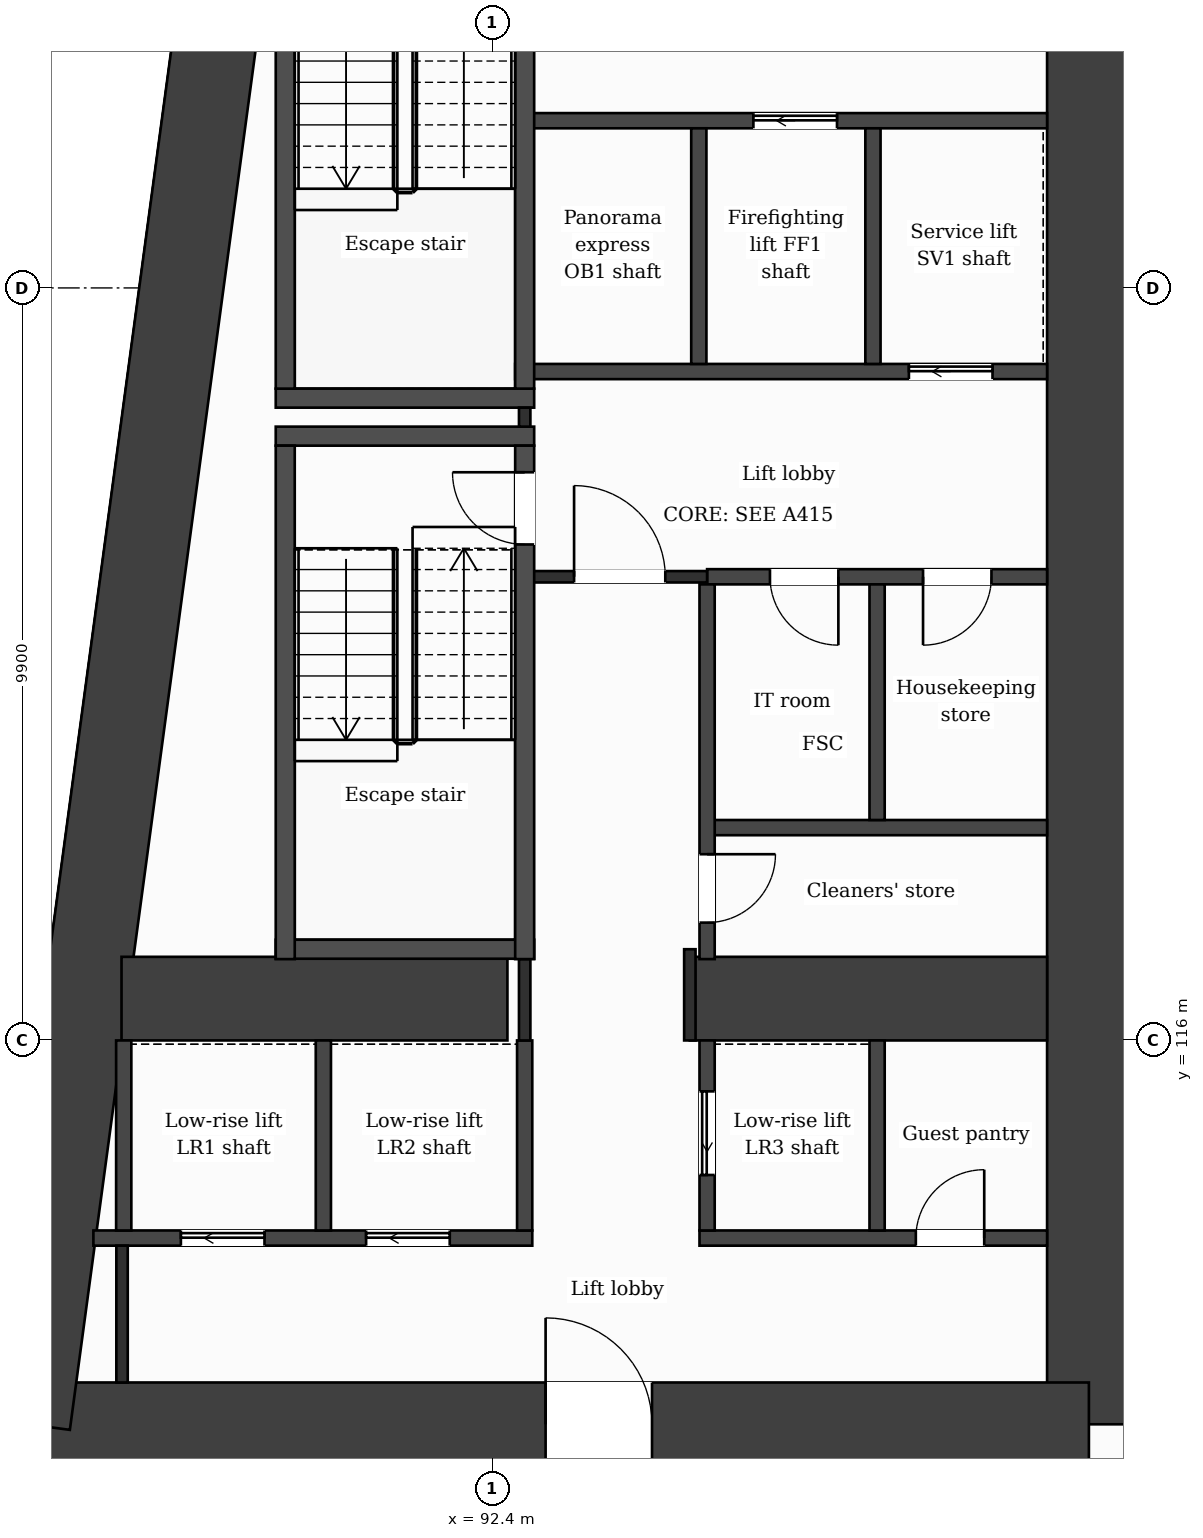
"""IFC4 building model, lengths in metres.
Left out: names, types, materials, properties, quantities, classifications, styles, units other than length and angle.
Written with IfcOpenShell. Run it as: python <this file> out.ifc"""

import sys

from ifc_helpers import new_model, si_unit, direction, frame, frame_2d, origin, place, context, subcontext, project, spatial, rectangle, extrude, element, fill, save


model = new_model("IFC4")
c1 = context("Model", 3, precision=1e-05, world=origin(), true_north=direction((0.0, 1.0)))
c2 = subcontext(c1, "Body", "Model", "MODEL_VIEW")
j1 = project(units=[si_unit("LENGTHUNIT", "METRE"), si_unit("PLANEANGLEUNIT", "RADIAN")], contexts=[c1])
p1 = place(None, origin())
s1 = spatial("IfcSite", under=j1, at=p1, CompositionType="ELEMENT")
p2 = place(p1, origin())
s2 = spatial("IfcBuilding", under=s1, at=p2, CompositionType="ELEMENT")
p3 = place(p2, frame((0.0, 0.0, 67.0)))
s3 = spatial("IfcBuildingStorey", under=s2, at=p3, CompositionType="ELEMENT", Elevation=67.0)
p4 = place(p3, frame((100.25, 131.85, 0.0), z_axis=(0.0, 0.0, 1.0), x_axis=(0.0, -1.0, 0.0)))
e1 = element("IfcWall", 1, at=p4, inside=s3, PredefinedType="SHEAR", context=c2, shape_type="SweptSolid", body=[
    extrude(rectangle(XDim=20.9, YDim=1.1, at=frame_2d((10.45, 0.0))), origin(), (0.0, 0.0, 1.0), 3.5),
])
p5 = place(p3, frame((100.25, 110.95, 0.0), z_axis=(0.0, 0.0, 1.0), x_axis=(-1.0, 0.0, 0.0)))
e2 = element("IfcWall", 2, at=p5, inside=s3, PredefinedType="SHEAR", context=c2, shape_type="SweptSolid", body=[
    extrude(rectangle(XDim=13.952, YDim=1.1, at=frame_2d((6.976, 0.0))), origin(), (0.0, 0.0, 1.0), 3.5),
])
p6 = place(p5, frame((5.748, 0.0, 0.0)))
e3 = element("IfcOpeningElement", 3, at=p6, cuts=e2, PredefinedType="OPENING", context=c2, shape_type="SweptSolid", body=[
    extrude(rectangle(XDim=1.4, YDim=2.1, at=frame_2d((0.7, 1.05))), frame((0.0, 0.56, 0.0), z_axis=(0.0, -1.0, 0.0), x_axis=(1.0, 0.0, 0.0)), (0.0, 0.0, 1.0), 1.12),
])
p7 = place(p3, frame((86.298, 110.95, 0.0), z_axis=(0.0, 0.0, 1.0), x_axis=(0.133400422634, 0.99106222168, 0.0)))
e4 = element("IfcWall", 4, at=p7, inside=s3, PredefinedType="SHEAR", context=c2, shape_type="SweptSolid", body=[
    extrude(rectangle(XDim=21.089, YDim=1.1, at=frame_2d((10.544, 0.0))), origin(), (0.0, 0.0, 1.0), 3.5),
])
p8 = place(p3, frame((87.523, 116.55, 0.0), z_axis=(0.0, 0.0, 1.0), x_axis=(1.0, 0.0, 0.0)))
e5 = element("IfcWall", 5, at=p8, inside=s3, PredefinedType="SHEAR", context=c2, shape_type="SweptSolid", body=[
    extrude(rectangle(XDim=5.077, YDim=1.1, at=frame_2d((2.539, 0.0))), origin(), (0.0, 0.0, 1.0), 3.5),
])
p9 = place(p3, frame((95.0, 116.55, 0.0), z_axis=(0.0, 0.0, 1.0), x_axis=(1.0, 0.0, 0.0)))
e6 = element("IfcWall", 6, at=p9, inside=s3, PredefinedType="SHEAR", context=c2, shape_type="SweptSolid", body=[
    extrude(rectangle(XDim=4.7, YDim=1.1, at=frame_2d((2.35, 0.0))), origin(), (0.0, 0.0, 1.0), 3.5),
])
p10 = place(p3, frame((87.153, 113.4, 0.0), z_axis=(0.0, 0.0, 1.0), x_axis=(1.0, 0.0, 0.0)))
e7 = element("IfcWall", 7, at=p10, inside=s3, PredefinedType="PARTITIONING", context=c2, shape_type="SweptSolid", body=[
    extrude(rectangle(XDim=5.774, YDim=0.2, at=frame_2d((2.887, 0.0))), origin(), (0.0, 0.0, 1.0), 3.18),
])
p11 = place(p10, frame((1.151, 0.0, 0.0)))
e8 = element("IfcOpeningElement", 8, at=p11, cuts=e7, PredefinedType="OPENING", context=c2, shape_type="SweptSolid", body=[
    extrude(rectangle(XDim=1.1, YDim=2.1, at=frame_2d((0.55, 1.05))), frame((0.0, 0.11, 0.0), z_axis=(0.0, -1.0, 0.0), x_axis=(1.0, 0.0, 0.0)), (0.0, 0.0, 1.0), 0.22),
])
p12 = place(p10, frame((3.588, 0.0, 0.0)))
e9 = element("IfcOpeningElement", 9, at=p12, cuts=e7, PredefinedType="OPENING", context=c2, shape_type="SweptSolid", body=[
    extrude(rectangle(XDim=1.1, YDim=2.1, at=frame_2d((0.55, 1.05))), frame((0.0, 0.11, 0.0), z_axis=(0.0, -1.0, 0.0), x_axis=(1.0, 0.0, 0.0)), (0.0, 0.0, 1.0), 0.22),
])
p13 = place(p3, frame((95.127, 113.4, 0.0), z_axis=(0.0, 0.0, 1.0), x_axis=(1.0, 0.0, 0.0)))
e10 = element("IfcWall", 10, at=p13, inside=s3, PredefinedType="PARTITIONING", context=c2, shape_type="SweptSolid", body=[
    extrude(rectangle(XDim=4.573, YDim=0.2, at=frame_2d((2.287, 0.0))), origin(), (0.0, 0.0, 1.0), 3.18),
])
p14 = place(p13, frame((2.846, 0.0, 0.0)))
e11 = element("IfcOpeningElement", 11, at=p14, cuts=e10, PredefinedType="OPENING", context=c2, shape_type="SweptSolid", body=[
    extrude(rectangle(XDim=0.9, YDim=2.1, at=frame_2d((0.45, 1.05))), frame((0.0, 0.11, 0.0), z_axis=(0.0, -1.0, 0.0), x_axis=(1.0, 0.0, 0.0)), (0.0, 0.0, 1.0), 0.22),
])
p15 = place(p3, frame((89.552, 117.2, 0.0), z_axis=(0.0, 0.0, 1.0), x_axis=(1.0, 0.0, 0.0)))
e12 = element("IfcWall", 12, at=p15, inside=s3, PredefinedType="PARTITIONING", context=c2, shape_type="SweptSolid", body=[
    extrude(rectangle(XDim=3.4, YDim=0.25, at=frame_2d((1.7, 0.0))), origin(), (0.0, 0.0, 1.0), 3.18),
])
p16 = place(p3, frame((95.227, 118.8, 0.0), z_axis=(0.0, 0.0, 1.0), x_axis=(1.0, 0.0, 0.0)))
e13 = element("IfcWall", 13, at=p16, inside=s3, PredefinedType="PARTITIONING", context=c2, shape_type="SweptSolid", body=[
    extrude(rectangle(XDim=4.473, YDim=0.2, at=frame_2d((2.236, 0.0))), origin(), (0.0, 0.0, 1.0), 3.18),
])
p17 = place(p3, frame((95.227, 122.1, 0.0), z_axis=(0.0, 0.0, 1.0), x_axis=(1.0, 0.0, 0.0)))
e14 = element("IfcWall", 14, at=p17, inside=s3, PredefinedType="PARTITIONING", context=c2, shape_type="SweptSolid", body=[
    extrude(rectangle(XDim=4.473, YDim=0.2, at=frame_2d((2.236, 0.0))), origin(), (0.0, 0.0, 1.0), 3.18),
])
p18 = place(p17, frame((0.827, 0.0, 0.0)))
e15 = element("IfcOpeningElement", 15, at=p18, cuts=e14, PredefinedType="OPENING", context=c2, shape_type="SweptSolid", body=[
    extrude(rectangle(XDim=0.9, YDim=2.1, at=frame_2d((0.45, 1.05))), frame((0.0, 0.11, 0.0), z_axis=(0.0, -1.0, 0.0), x_axis=(1.0, 0.0, 0.0)), (0.0, 0.0, 1.0), 0.22),
])
p19 = place(p17, frame((2.841, 0.0, 0.0)))
e16 = element("IfcOpeningElement", 16, at=p19, cuts=e14, PredefinedType="OPENING", context=c2, shape_type="SweptSolid", body=[
    extrude(rectangle(XDim=0.9, YDim=2.1, at=frame_2d((0.45, 1.05))), frame((0.0, 0.11, 0.0), z_axis=(0.0, -1.0, 0.0), x_axis=(1.0, 0.0, 0.0)), (0.0, 0.0, 1.0), 0.22),
])
p20 = place(p3, frame((92.827, 122.1, 0.0), z_axis=(0.0, 0.0, 1.0), x_axis=(1.0, 0.0, 0.0)))
e17 = element("IfcWall", 17, at=p20, inside=s3, PredefinedType="PARTITIONING", context=c2, shape_type="SweptSolid", body=[
    extrude(rectangle(XDim=2.4, YDim=0.15, at=frame_2d((1.2, 0.0))), origin(), (0.0, 0.0, 1.0), 3.18),
])
p21 = place(p20, frame((0.65, 0.0, 0.0)))
e18 = element("IfcOpeningElement", 18, at=p21, cuts=e17, PredefinedType="OPENING", context=c2, shape_type="SweptSolid", body=[
    extrude(rectangle(XDim=1.2, YDim=2.1, at=frame_2d((0.6, 1.05))), frame((0.0, 0.085, 0.0), z_axis=(0.0, -1.0, 0.0), x_axis=(1.0, 0.0, 0.0)), (0.0, 0.0, 1.0), 0.17),
])
for number, where, z_axis, x_axis in (
    (19, (89.552, 123.95, 0.0), (0.0, 0.0, 1.0), (1.0, 0.0, 0.0)),
    (20, (89.552, 124.45, 0.0), (0.0, 0.0, 1.0), (1.0, 0.0, 0.0)),
):
    element("IfcWall", number, at=place(p3, frame(where, z_axis=z_axis, x_axis=x_axis)), inside=s3, PredefinedType="PARTITIONING", context=c2, shape_type="SweptSolid", body=[
        extrude(rectangle(XDim=3.4, YDim=0.25, at=frame_2d((1.7, 0.0))), origin(), (0.0, 0.0, 1.0), 3.18),
    ])
p22 = place(p3, frame((92.702, 124.8, 0.0), z_axis=(0.0, 0.0, 1.0), x_axis=(1.0, 0.0, 0.0)))
e21 = element("IfcWall", 21, at=p22, inside=s3, PredefinedType="PARTITIONING", context=c2, shape_type="SweptSolid", body=[
    extrude(rectangle(XDim=6.998, YDim=0.2, at=frame_2d((3.499, 0.0))), origin(), (0.0, 0.0, 1.0), 3.18),
])
p23 = place(p22, frame((5.18, 0.0, 0.0)))
e22 = element("IfcOpeningElement", 22, at=p23, cuts=e21, PredefinedType="OPENING", context=c2, shape_type="SweptSolid", body=[
    extrude(rectangle(XDim=1.1, YDim=2.1, at=frame_2d((0.55, 1.05))), frame((0.0, 0.11, 0.0), z_axis=(0.0, -1.0, 0.0), x_axis=(1.0, 0.0, 0.0)), (0.0, 0.0, 1.0), 0.22),
])
p24 = place(p3, frame((92.827, 128.1, 0.0), z_axis=(0.0, 0.0, 1.0), x_axis=(1.0, 0.0, 0.0)))
e23 = element("IfcWall", 23, at=p24, inside=s3, PredefinedType="PARTITIONING", context=c2, shape_type="SweptSolid", body=[
    extrude(rectangle(XDim=6.873, YDim=0.2, at=frame_2d((3.437, 0.0))), origin(), (0.0, 0.0, 1.0), 3.18),
])
p25 = place(p24, frame((3.009, 0.0, 0.0)))
e24 = element("IfcOpeningElement", 24, at=p25, cuts=e23, PredefinedType="OPENING", context=c2, shape_type="SweptSolid", body=[
    extrude(rectangle(XDim=1.1, YDim=2.1, at=frame_2d((0.55, 1.05))), frame((0.0, 0.11, 0.0), z_axis=(0.0, -1.0, 0.0), x_axis=(1.0, 0.0, 0.0)), (0.0, 0.0, 1.0), 0.22),
])
p26 = place(p3, frame((87.552, 113.5, 0.0), z_axis=(0.0, 0.0, 1.0), x_axis=(0.0, 1.0, 0.0)))
e25 = element("IfcWall", 25, at=p26, inside=s3, PredefinedType="PARTITIONING", context=c2, shape_type="SweptSolid", body=[
    extrude(rectangle(XDim=2.5, YDim=0.2, at=frame_2d((1.25, 0.0))), origin(), (0.0, 0.0, 1.0), 3.18),
])
p27 = place(p3, frame((87.53, 111.5, 0.0), z_axis=(0.0, 0.0, 1.0), x_axis=(0.0, 1.0, 0.0)))
e26 = element("IfcWall", 26, at=p27, inside=s3, PredefinedType="PARTITIONING", context=c2, shape_type="SweptSolid", body=[
    extrude(rectangle(XDim=1.8, YDim=0.15, at=frame_2d((0.9, 0.0))), origin(), (0.0, 0.0, 1.0), 3.18),
])
p28 = place(p3, frame((89.677, 117.07, 0.0), z_axis=(0.0, 0.0, 1.0), x_axis=(0.0, 1.0, 0.0)))
e27 = element("IfcWall", 27, at=p28, inside=s3, PredefinedType="PARTITIONING", context=c2, shape_type="SweptSolid", body=[
    extrude(rectangle(XDim=6.755, YDim=0.25, at=frame_2d((3.377, 0.0))), origin(), (0.0, 0.0, 1.0), 3.18),
])
p29 = place(p3, frame((89.677, 124.575, 0.0), z_axis=(0.0, 0.0, 1.0), x_axis=(0.0, 1.0, 0.0)))
e28 = element("IfcWall", 28, at=p29, inside=s3, PredefinedType="PARTITIONING", context=c2, shape_type="SweptSolid", body=[
    extrude(rectangle(XDim=6.5, YDim=0.25, at=frame_2d((3.25, 0.0))), origin(), (0.0, 0.0, 1.0), 3.18),
])
for number, where, z_axis, x_axis in (
    (29, (90.178, 113.5, 0.0), (0.0, 0.0, 1.0), (0.0, 1.0, 0.0)),
    (30, (92.827, 113.5, 0.0), (0.0, 0.0, 1.0), (0.0, 1.0, 0.0)),
):
    element("IfcWall", number, at=place(p3, frame(where, z_axis=z_axis, x_axis=x_axis)), inside=s3, PredefinedType="PARTITIONING", context=c2, shape_type="SweptSolid", body=[
        extrude(rectangle(XDim=2.5, YDim=0.2, at=frame_2d((1.25, 0.0))), origin(), (0.0, 0.0, 1.0), 3.18),
    ])
p30 = place(p3, frame((92.827, 116.0, 0.0), z_axis=(0.0, 0.0, 1.0), x_axis=(0.0, 1.0, 0.0)))
e31 = element("IfcWall", 31, at=p30, inside=s3, PredefinedType="PARTITIONING", context=c2, shape_type="SweptSolid", body=[
    extrude(rectangle(XDim=1.07, YDim=0.15, at=frame_2d((0.535, 0.0))), origin(), (0.0, 0.0, 1.0), 3.18),
])
p31 = place(p3, frame((92.827, 124.075, 0.0), z_axis=(0.0, 0.0, 1.0), x_axis=(0.0, 1.0, 0.0)))
e32 = element("IfcWall", 32, at=p31, inside=s3, PredefinedType="PARTITIONING", context=c2, shape_type="SweptSolid", body=[
    extrude(rectangle(XDim=0.25, YDim=0.15, at=frame_2d((0.125, 0.0))), origin(), (0.0, 0.0, 1.0), 3.18),
])
p32 = place(p3, frame((92.827, 117.07, 0.0), z_axis=(0.0, 0.0, 1.0), x_axis=(0.0, 1.0, 0.0)))
e33 = element("IfcWall", 33, at=p32, inside=s3, PredefinedType="PARTITIONING", context=c2, shape_type="SweptSolid", body=[
    extrude(rectangle(XDim=6.755, YDim=0.25, at=frame_2d((3.377, 0.0))), origin(), (0.0, 0.0, 1.0), 3.18),
])
p33 = place(p32, frame((5.455, 0.0, 0.0)))
e34 = element("IfcOpeningElement", 34, at=p33, cuts=e33, PredefinedType="OPENING", context=c2, shape_type="SweptSolid", body=[
    extrude(rectangle(XDim=0.95, YDim=2.1, at=frame_2d((0.475, 1.05))), frame((0.0, 0.135, 0.0), z_axis=(0.0, -1.0, 0.0), x_axis=(1.0, 0.0, 0.0)), (0.0, 0.0, 1.0), 0.27),
])
p34 = place(p3, frame((92.827, 124.575, 0.0), z_axis=(0.0, 0.0, 1.0), x_axis=(0.0, 1.0, 0.0)))
e35 = element("IfcWall", 35, at=p34, inside=s3, PredefinedType="PARTITIONING", context=c2, shape_type="SweptSolid", body=[
    extrude(rectangle(XDim=6.755, YDim=0.25, at=frame_2d((3.377, 0.0))), origin(), (0.0, 0.0, 1.0), 3.18),
])
p35 = place(p34, frame((5.325, 0.0, 0.0)))
e36 = element("IfcOpeningElement", 36, at=p35, cuts=e35, PredefinedType="OPENING", context=c2, shape_type="SweptSolid", body=[
    extrude(rectangle(XDim=1.0, YDim=2.1, at=frame_2d((0.5, 1.05))), frame((0.0, 0.135, 0.0), z_axis=(0.0, -1.0, 0.0), x_axis=(1.0, 0.0, 0.0)), (0.0, 0.0, 1.0), 0.27),
])
p36 = place(p3, frame((95.0, 116.0, 0.0), z_axis=(0.0, 0.0, 1.0), x_axis=(0.0, 1.0, 0.0)))
e37 = element("IfcWall", 37, at=p36, inside=s3, PredefinedType="PARTITIONING", context=c2, shape_type="SweptSolid", body=[
    extrude(rectangle(XDim=1.2, YDim=0.15, at=frame_2d((0.6, 0.0))), origin(), (0.0, 0.0, 1.0), 3.18),
])
p37 = place(p3, frame((95.118, 124.9, 0.0), z_axis=(0.0, 0.0, 1.0), x_axis=(0.0, 1.0, 0.0)))
e38 = element("IfcWall", 38, at=p37, inside=s3, PredefinedType="PARTITIONING", context=c2, shape_type="SweptSolid", body=[
    extrude(rectangle(XDim=3.1, YDim=0.2, at=frame_2d((1.55, 0.0))), origin(), (0.0, 0.0, 1.0), 3.18),
])
p38 = place(p3, frame((95.227, 113.5, 0.0), z_axis=(0.0, 0.0, 1.0), x_axis=(0.0, 1.0, 0.0)))
e39 = element("IfcWall", 39, at=p38, inside=s3, PredefinedType="PARTITIONING", context=c2, shape_type="SweptSolid", body=[
    extrude(rectangle(XDim=2.5, YDim=0.2, at=frame_2d((1.25, 0.0))), origin(), (0.0, 0.0, 1.0), 3.18),
])
p39 = place(p38, frame((0.73, 0.0, 0.0)))
e40 = element("IfcOpeningElement", 40, at=p39, cuts=e39, PredefinedType="OPENING", context=c2, shape_type="SweptSolid", body=[
    extrude(rectangle(XDim=1.1, YDim=2.1, at=frame_2d((0.55, 1.05))), frame((0.0, 0.11, 0.0), z_axis=(0.0, -1.0, 0.0), x_axis=(1.0, 0.0, 0.0)), (0.0, 0.0, 1.0), 0.22),
])
p40 = place(p3, frame((95.227, 117.07, 0.0), z_axis=(0.0, 0.0, 1.0), x_axis=(0.0, 1.0, 0.0)))
e41 = element("IfcWall", 41, at=p40, inside=s3, PredefinedType="PARTITIONING", context=c2, shape_type="SweptSolid", body=[
    extrude(rectangle(XDim=4.93, YDim=0.2, at=frame_2d((2.465, 0.0))), origin(), (0.0, 0.0, 1.0), 3.18),
])
p41 = place(p40, frame((0.48, 0.0, 0.0)))
e42 = element("IfcOpeningElement", 42, at=p41, cuts=e41, PredefinedType="OPENING", context=c2, shape_type="SweptSolid", body=[
    extrude(rectangle(XDim=0.9, YDim=2.1, at=frame_2d((0.45, 1.05))), frame((0.0, 0.11, 0.0), z_axis=(0.0, -1.0, 0.0), x_axis=(1.0, 0.0, 0.0)), (0.0, 0.0, 1.0), 0.22),
])
p42 = place(p3, frame((97.409, 124.9, 0.0), z_axis=(0.0, 0.0, 1.0), x_axis=(0.0, 1.0, 0.0)))
e43 = element("IfcWall", 43, at=p42, inside=s3, PredefinedType="PARTITIONING", context=c2, shape_type="SweptSolid", body=[
    extrude(rectangle(XDim=3.1, YDim=0.2, at=frame_2d((1.55, 0.0))), origin(), (0.0, 0.0, 1.0), 3.18),
])
p43 = place(p3, frame((97.463, 113.5, 0.0), z_axis=(0.0, 0.0, 1.0), x_axis=(0.0, 1.0, 0.0)))
e44 = element("IfcWall", 44, at=p43, inside=s3, PredefinedType="PARTITIONING", context=c2, shape_type="SweptSolid", body=[
    extrude(rectangle(XDim=2.5, YDim=0.2, at=frame_2d((1.25, 0.0))), origin(), (0.0, 0.0, 1.0), 3.18),
])
p44 = place(p3, frame((97.463, 118.9, 0.0), z_axis=(0.0, 0.0, 1.0), x_axis=(0.0, 1.0, 0.0)))
e45 = element("IfcWall", 45, at=p44, inside=s3, PredefinedType="PARTITIONING", context=c2, shape_type="SweptSolid", body=[
    extrude(rectangle(XDim=3.1, YDim=0.2, at=frame_2d((1.55, 0.0))), origin(), (0.0, 0.0, 1.0), 3.18),
])
p45 = place(p21, origin())
e46 = element("IfcDoor", 46, at=p45, inside=s3, OperationType="SINGLE_SWING_LEFT", PredefinedType="DOOR", context=c2, shape_type="SweptSolid", body=[
    extrude(rectangle(XDim=1.2, YDim=2.1, at=frame_2d((0.6, 1.05))), frame((0.0, 0.025, 0.0), z_axis=(0.0, -1.0, 0.0), x_axis=(1.0, 0.0, 0.0)), (0.0, 0.0, 1.0), 0.05),
])
fill(e18, e46)
p46 = place(p25, origin())
e47 = element("IfcDoor", 47, at=p46, inside=s3, OperationType="SLIDING_TO_LEFT", PredefinedType="DOOR", context=c2, shape_type="SweptSolid", body=[
    extrude(rectangle(XDim=1.1, YDim=2.1, at=frame_2d((0.55, 1.05))), frame((0.0, 0.025, 0.0), z_axis=(0.0, -1.0, 0.0), x_axis=(1.0, 0.0, 0.0)), (0.0, 0.0, 1.0), 0.05),
])
fill(e24, e47)
p47 = place(p23, origin())
e48 = element("IfcDoor", 48, at=p47, inside=s3, OperationType="SLIDING_TO_LEFT", PredefinedType="DOOR", context=c2, shape_type="SweptSolid", body=[
    extrude(rectangle(XDim=1.1, YDim=2.1, at=frame_2d((0.55, 1.05))), frame((0.0, 0.025, 0.0), z_axis=(0.0, -1.0, 0.0), x_axis=(1.0, 0.0, 0.0)), (0.0, 0.0, 1.0), 0.05),
])
fill(e22, e48)
p48 = place(p18, origin())
e49 = element("IfcDoor", 49, at=p48, inside=s3, OperationType="SINGLE_SWING_RIGHT", PredefinedType="DOOR", context=c2, shape_type="SweptSolid", body=[
    extrude(rectangle(XDim=0.9, YDim=2.1, at=frame_2d((0.45, 1.05))), frame((0.0, 0.025, 0.0), z_axis=(0.0, -1.0, 0.0), x_axis=(1.0, 0.0, 0.0)), (0.0, 0.0, 1.0), 0.05),
])
fill(e15, e49)
p49 = place(p19, origin())
e50 = element("IfcDoor", 50, at=p49, inside=s3, OperationType="SINGLE_SWING_LEFT", PredefinedType="DOOR", context=c2, shape_type="SweptSolid", body=[
    extrude(rectangle(XDim=0.9, YDim=2.1, at=frame_2d((0.45, 1.05))), frame((0.0, 0.025, 0.0), z_axis=(0.0, -1.0, 0.0), x_axis=(1.0, 0.0, 0.0)), (0.0, 0.0, 1.0), 0.05),
])
fill(e16, e50)
p50 = place(p33, origin())
e51 = element("IfcDoor", 51, at=p50, inside=s3, OperationType="SINGLE_SWING_RIGHT", PredefinedType="DOOR", context=c2, shape_type="SweptSolid", body=[
    extrude(rectangle(XDim=0.95, YDim=2.1, at=frame_2d((0.475, 1.05))), frame((0.0, 0.025, 0.0), z_axis=(0.0, -1.0, 0.0), x_axis=(1.0, 0.0, 0.0)), (0.0, 0.0, 1.0), 0.05),
])
fill(e34, e51)
p51 = place(p41, origin())
e52 = element("IfcDoor", 52, at=p51, inside=s3, OperationType="SINGLE_SWING_RIGHT", PredefinedType="DOOR", context=c2, shape_type="SweptSolid", body=[
    extrude(rectangle(XDim=0.9, YDim=2.1, at=frame_2d((0.45, 1.05))), frame((0.0, 0.025, 0.0), z_axis=(0.0, -1.0, 0.0), x_axis=(1.0, 0.0, 0.0)), (0.0, 0.0, 1.0), 0.05),
])
fill(e42, e52)
p52 = place(p11, origin())
e53 = element("IfcDoor", 53, at=p52, inside=s3, OperationType="SLIDING_TO_LEFT", PredefinedType="DOOR", context=c2, shape_type="SweptSolid", body=[
    extrude(rectangle(XDim=1.1, YDim=2.1, at=frame_2d((0.55, 1.05))), frame((0.0, 0.025, 0.0), z_axis=(0.0, -1.0, 0.0), x_axis=(1.0, 0.0, 0.0)), (0.0, 0.0, 1.0), 0.05),
])
fill(e8, e53)
p53 = place(p12, origin())
e54 = element("IfcDoor", 54, at=p53, inside=s3, OperationType="SLIDING_TO_LEFT", PredefinedType="DOOR", context=c2, shape_type="SweptSolid", body=[
    extrude(rectangle(XDim=1.1, YDim=2.1, at=frame_2d((0.55, 1.05))), frame((0.0, 0.025, 0.0), z_axis=(0.0, -1.0, 0.0), x_axis=(1.0, 0.0, 0.0)), (0.0, 0.0, 1.0), 0.05),
])
fill(e9, e54)
p54 = place(p39, origin())
e55 = element("IfcDoor", 55, at=p54, inside=s3, OperationType="SLIDING_TO_LEFT", PredefinedType="DOOR", context=c2, shape_type="SweptSolid", body=[
    extrude(rectangle(XDim=1.1, YDim=2.1, at=frame_2d((0.55, 1.05))), frame((0.0, 0.025, 0.0), z_axis=(0.0, -1.0, 0.0), x_axis=(1.0, 0.0, 0.0)), (0.0, 0.0, 1.0), 0.05),
])
fill(e40, e55)
p55 = place(p14, origin())
e56 = element("IfcDoor", 56, at=p55, inside=s3, OperationType="SINGLE_SWING_RIGHT", PredefinedType="DOOR", context=c2, shape_type="SweptSolid", body=[
    extrude(rectangle(XDim=0.9, YDim=2.1, at=frame_2d((0.45, 1.05))), frame((0.0, 0.025, 0.0), z_axis=(0.0, -1.0, 0.0), x_axis=(1.0, 0.0, 0.0)), (0.0, 0.0, 1.0), 0.05),
])
fill(e11, e56)
p56 = place(p6, origin())
e57 = element("IfcDoor", 57, at=p56, inside=s3, OperationType="SINGLE_SWING_RIGHT", PredefinedType="DOOR", context=c2, shape_type="SweptSolid", body=[
    extrude(rectangle(XDim=1.4, YDim=2.1, at=frame_2d((0.7, 1.05))), frame((0.0, 0.025, 0.0), z_axis=(0.0, -1.0, 0.0), x_axis=(1.0, 0.0, 0.0)), (0.0, 0.0, 1.0), 0.05),
])
fill(e3, e57)
save(model, sys.argv[1])
